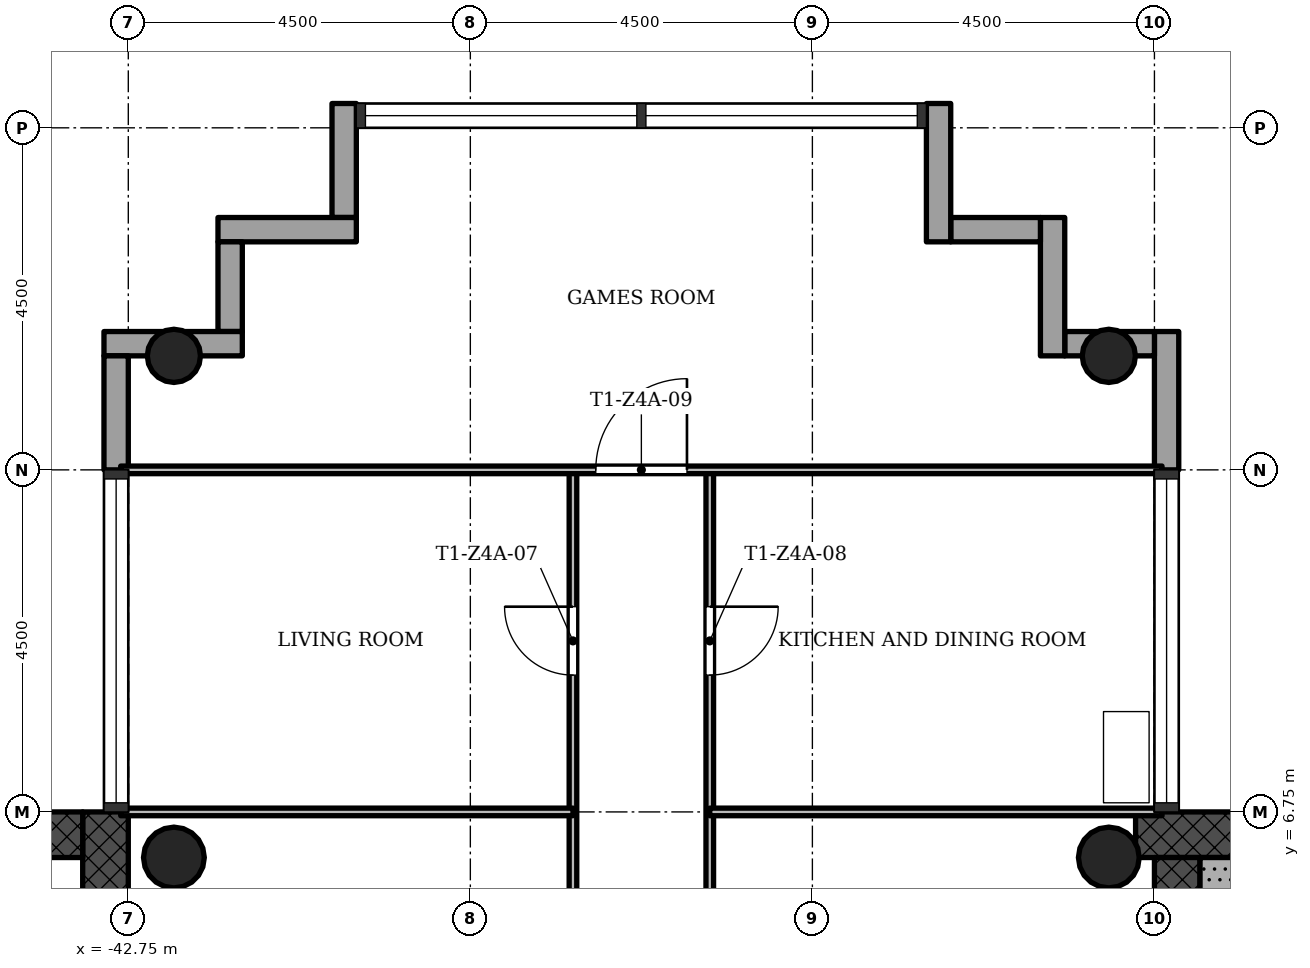
"""IFC4 building model, lengths in metres.
Left out: names, types, materials, properties, quantities, classifications, styles, units other than length and angle.
Written with IfcOpenShell. Run it as: python <this file> out.ifc"""

import sys

from ifc_helpers import new_model, si_unit, direction, frame, frame_2d, origin, origin_2d, place, context, subcontext, project, spatial, rectangle, hollow_circle, extrude, element, fill, save


model = new_model("IFC4")
c1 = context("Model", 3, precision=1e-05, world=origin(), true_north=direction((0.0, 1.0)))
c2 = subcontext(c1, "Body", "Model", "MODEL_VIEW")
j1 = project(units=[si_unit("LENGTHUNIT", "METRE"), si_unit("PLANEANGLEUNIT", "RADIAN")], contexts=[c1])
p1 = place(None, origin())
s1 = spatial("IfcSite", under=j1, at=p1, CompositionType="ELEMENT")
p2 = place(p1, origin())
s2 = spatial("IfcBuilding", under=s1, at=p2, CompositionType="ELEMENT")
p3 = place(p2, frame((0.0, 0.0, 226.6)))
s3 = spatial("IfcBuildingStorey", under=s2, at=p3, CompositionType="ELEMENT", Elevation=226.6)
p4 = place(p3, frame((-20.602, 6.45, 0.0), z_axis=(0.0, 0.0, 1.0), x_axis=(-1.0, 0.0, 0.0)))
e1 = element("IfcWall", 1, at=p4, inside=s3, PredefinedType="SHEAR", context=c2, shape_type="SweptSolid", body=[
    extrude(rectangle(XDim=8.896, YDim=0.6, at=frame_2d((4.448, 0.0))), origin(), (0.0, 0.0, 1.0), 3.4),
])
p5 = place(p3, frame((-28.95, 6.15, 0.0), z_axis=(0.0, 0.0, 1.0), x_axis=(0.0, -1.0, 0.0)))
e2 = element("IfcWall", 2, at=p5, inside=s3, PredefinedType="SHEAR", context=c2, shape_type="SweptSolid", body=[
    extrude(rectangle(XDim=12.9, YDim=0.6, at=frame_2d((6.45, 0.0))), origin(), (0.0, 0.0, 1.0), 3.4),
])
p6 = place(p5, frame((5.25, 0.0, 0.0)))
e3 = element("IfcOpeningElement", 3, at=p6, cuts=e2, PredefinedType="OPENING", context=c2, shape_type="SweptSolid", body=[
    extrude(rectangle(XDim=1.8, YDim=2.1, at=frame_2d((0.9, 1.05))), frame((0.0, 0.31, 0.0), z_axis=(0.0, -1.0, 0.0), x_axis=(1.0, 0.0, 0.0)), (0.0, 0.0, 1.0), 0.62),
])
p7 = place(p3, frame((-43.05, -6.15, 0.0), z_axis=(0.0, 0.0, 1.0), x_axis=(0.0, 1.0, 0.0)))
e4 = element("IfcWall", 4, at=p7, inside=s3, PredefinedType="SHEAR", context=c2, shape_type="SweptSolid", body=[
    extrude(rectangle(XDim=12.9, YDim=0.6, at=frame_2d((6.45, 0.0))), origin(), (0.0, 0.0, 1.0), 3.4),
])
p8 = place(p7, frame((5.25, 0.0, 0.0)))
e5 = element("IfcOpeningElement", 5, at=p8, cuts=e4, PredefinedType="OPENING", context=c2, shape_type="SweptSolid", body=[
    extrude(rectangle(XDim=1.8, YDim=2.1, at=frame_2d((0.9, 1.05))), frame((0.0, 0.31, 0.0), z_axis=(0.0, -1.0, 0.0), x_axis=(1.0, 0.0, 0.0)), (0.0, 0.0, 1.0), 0.62),
])
p9 = place(p3, frame((-43.35, 6.45, 0.0), z_axis=(0.0, 0.0, 1.0), x_axis=(-1.0, 0.0, 0.0)))
e6 = element("IfcWall", 6, at=p9, inside=s3, PredefinedType="SHEAR", context=c2, shape_type="SweptSolid", body=[
    extrude(rectangle(XDim=8.4, YDim=0.6, at=frame_2d((4.2, 0.0))), origin(), (0.0, 0.0, 1.0), 3.4),
])
for number, where, z_axis, x_axis in (
    (7, (-29.85, 12.75, 0.0), (0.0, 0.0, 1.0), (1.0, 0.0, 0.0)),
    (8, (-42.15, 12.75, 0.0), (0.0, 0.0, 1.0), (1.0, 0.0, 0.0)),
):
    element("IfcColumn", number, at=place(p3, frame(where, z_axis=z_axis, x_axis=x_axis)), inside=s3, PredefinedType="COLUMN", context=c2, shape_type="SweptSolid", body=[
        extrude(hollow_circle(Radius=0.35, WallThickness=0.025, at=origin_2d()), origin(), (0.0, 0.0, 1.0), 3.4),
    ])
for number, where, z_axis, x_axis in (
    (9, (-29.85, 6.15, 0.0), (0.0, 0.0, 1.0), (1.0, 0.0, 0.0)),
    (10, (-42.15, 6.15, 0.0), (0.0, 0.0, 1.0), (1.0, 0.0, 0.0)),
):
    element("IfcColumn", number, at=place(p3, frame(where, z_axis=z_axis, x_axis=x_axis)), inside=s3, PredefinedType="COLUMN", context=c2, shape_type="SweptSolid", body=[
        extrude(hollow_circle(Radius=0.4, WallThickness=0.028, at=origin_2d()), origin(), (0.0, 0.0, 1.0), 3.4),
    ])
p10 = place(p3, frame((-29.09, 11.25, -0.3), z_axis=(0.0, 0.0, 1.0), x_axis=(0.0, 1.0, 0.0)))
e11 = element("IfcWall", 11, at=p10, inside=s3, PredefinedType="STANDARD", context=c2, shape_type="SweptSolid", body=[
    extrude(rectangle(XDim=1.82, YDim=0.32, at=frame_2d((0.91, 0.0))), origin(), (0.0, 0.0, 1.0), 3.4),
])
p11 = place(p3, frame((-29.25, 12.91, -0.3), z_axis=(0.0, 0.0, 1.0), x_axis=(-1.0, 0.0, 0.0)))
e12 = element("IfcWall", 12, at=p11, inside=s3, PredefinedType="STANDARD", context=c2, shape_type="SweptSolid", body=[
    extrude(rectangle(XDim=1.18, YDim=0.32, at=frame_2d((0.59, 0.0))), origin(), (0.0, 0.0, 1.0), 3.4),
])
p12 = place(p3, frame((-30.59, 12.75, -0.3), z_axis=(0.0, 0.0, 1.0), x_axis=(0.0, 1.0, 0.0)))
e13 = element("IfcWall", 13, at=p12, inside=s3, PredefinedType="STANDARD", context=c2, shape_type="SweptSolid", body=[
    extrude(rectangle(XDim=1.82, YDim=0.32, at=frame_2d((0.91, 0.0))), origin(), (0.0, 0.0, 1.0), 3.4),
])
p13 = place(p3, frame((-30.75, 14.41, -0.3), z_axis=(0.0, 0.0, 1.0), x_axis=(-1.0, 0.0, 0.0)))
e14 = element("IfcWall", 14, at=p13, inside=s3, PredefinedType="STANDARD", context=c2, shape_type="SweptSolid", body=[
    extrude(rectangle(XDim=1.18, YDim=0.32, at=frame_2d((0.59, 0.0))), origin(), (0.0, 0.0, 1.0), 3.4),
])
p14 = place(p3, frame((-32.09, 14.25, -0.3), z_axis=(0.0, 0.0, 1.0), x_axis=(0.0, 1.0, 0.0)))
e15 = element("IfcWall", 15, at=p14, inside=s3, PredefinedType="STANDARD", context=c2, shape_type="SweptSolid", body=[
    extrude(rectangle(XDim=1.82, YDim=0.32, at=frame_2d((0.91, 0.0))), origin(), (0.0, 0.0, 1.0), 3.4),
])
p15 = place(p3, frame((-39.91, 16.07, -0.3), z_axis=(0.0, 0.0, 1.0), x_axis=(0.0, -1.0, 0.0)))
e16 = element("IfcWall", 16, at=p15, inside=s3, PredefinedType="STANDARD", context=c2, shape_type="SweptSolid", body=[
    extrude(rectangle(XDim=1.5, YDim=0.32, at=frame_2d((0.75, 0.0))), origin(), (0.0, 0.0, 1.0), 3.4),
])
p16 = place(p3, frame((-39.75, 14.41, -0.3), z_axis=(0.0, 0.0, 1.0), x_axis=(-1.0, 0.0, 0.0)))
e17 = element("IfcWall", 17, at=p16, inside=s3, PredefinedType="STANDARD", context=c2, shape_type="SweptSolid", body=[
    extrude(rectangle(XDim=1.82, YDim=0.32, at=frame_2d((0.91, 0.0))), origin(), (0.0, 0.0, 1.0), 3.4),
])
p17 = place(p3, frame((-41.41, 14.25, -0.3), z_axis=(0.0, 0.0, 1.0), x_axis=(0.0, -1.0, 0.0)))
e18 = element("IfcWall", 18, at=p17, inside=s3, PredefinedType="STANDARD", context=c2, shape_type="SweptSolid", body=[
    extrude(rectangle(XDim=1.18, YDim=0.32, at=frame_2d((0.59, 0.0))), origin(), (0.0, 0.0, 1.0), 3.4),
])
p18 = place(p3, frame((-41.25, 12.91, -0.3), z_axis=(0.0, 0.0, 1.0), x_axis=(-1.0, 0.0, 0.0)))
e19 = element("IfcWall", 19, at=p18, inside=s3, PredefinedType="STANDARD", context=c2, shape_type="SweptSolid", body=[
    extrude(rectangle(XDim=1.82, YDim=0.32, at=frame_2d((0.91, 0.0))), origin(), (0.0, 0.0, 1.0), 3.4),
])
p19 = place(p3, frame((-42.91, 12.75, -0.3), z_axis=(0.0, 0.0, 1.0), x_axis=(0.0, -1.0, 0.0)))
e20 = element("IfcWall", 20, at=p19, inside=s3, PredefinedType="STANDARD", context=c2, shape_type="SweptSolid", body=[
    extrude(rectangle(XDim=1.5, YDim=0.32, at=frame_2d((0.75, 0.0))), origin(), (0.0, 0.0, 1.0), 3.4),
])
p20 = place(p3, frame((-36.9, 4.5, 0.0), z_axis=(0.0, 0.0, 1.0), x_axis=(0.0, 1.0, 0.0)))
e21 = element("IfcWall", 21, at=p20, inside=s3, PredefinedType="PARTITIONING", context=c2, shape_type="SweptSolid", body=[
    extrude(rectangle(XDim=6.75, YDim=0.1, at=frame_2d((3.375, 0.0))), origin(), (0.0, 0.0, 1.0), 3.0),
])
p21 = place(p20, frame((4.05, 0.0, 0.0)))
e22 = element("IfcOpeningElement", 22, at=p21, cuts=e21, PredefinedType="OPENING", context=c2, shape_type="SweptSolid", body=[
    extrude(rectangle(XDim=0.9, YDim=2.1, at=frame_2d((0.45, 1.05))), frame((0.0, 0.06, 0.0), z_axis=(0.0, -1.0, 0.0), x_axis=(1.0, 0.0, 0.0)), (0.0, 0.0, 1.0), 0.12),
])
p22 = place(p3, frame((-35.1, 4.5, 0.0), z_axis=(0.0, 0.0, 1.0), x_axis=(0.0, 1.0, 0.0)))
e23 = element("IfcWall", 23, at=p22, inside=s3, PredefinedType="PARTITIONING", context=c2, shape_type="SweptSolid", body=[
    extrude(rectangle(XDim=6.75, YDim=0.1, at=frame_2d((3.375, 0.0))), origin(), (0.0, 0.0, 1.0), 3.0),
])
p23 = place(p22, frame((4.05, 0.0, 0.0)))
e24 = element("IfcOpeningElement", 24, at=p23, cuts=e23, PredefinedType="OPENING", context=c2, shape_type="SweptSolid", body=[
    extrude(rectangle(XDim=0.9, YDim=2.1, at=frame_2d((0.45, 1.05))), frame((0.0, 0.06, 0.0), z_axis=(0.0, -1.0, 0.0), x_axis=(1.0, 0.0, 0.0)), (0.0, 0.0, 1.0), 0.12),
])
for number, where, z_axis, x_axis in (
    (25, (-42.85, 6.75, 0.0), (0.0, 0.0, 1.0), (1.0, 0.0, 0.0)),
    (26, (-35.1, 6.75, 0.0), (0.0, 0.0, 1.0), (1.0, 0.0, 0.0)),
):
    element("IfcWall", number, at=place(p3, frame(where, z_axis=z_axis, x_axis=x_axis)), inside=s3, PredefinedType="PARTITIONING", context=c2, shape_type="SweptSolid", body=[
        extrude(rectangle(XDim=5.95, YDim=0.1, at=frame_2d((2.975, 0.0))), origin(), (0.0, 0.0, 1.0), 3.0),
    ])
p24 = place(p3, frame((-42.85, 11.25, 0.0), z_axis=(0.0, 0.0, 1.0), x_axis=(1.0, 0.0, 0.0)))
e27 = element("IfcWall", 27, at=p24, inside=s3, PredefinedType="PARTITIONING", context=c2, shape_type="SweptSolid", body=[
    extrude(rectangle(XDim=13.7, YDim=0.1, at=frame_2d((6.85, 0.0))), origin(), (0.0, 0.0, 1.0), 3.0),
])
p25 = place(p24, frame((6.25, 0.0, 0.0)))
e28 = element("IfcOpeningElement", 28, at=p25, cuts=e27, PredefinedType="OPENING", context=c2, shape_type="SweptSolid", body=[
    extrude(rectangle(XDim=1.2, YDim=2.1, at=frame_2d((0.6, 1.05))), frame((0.0, 0.06, 0.0), z_axis=(0.0, -1.0, 0.0), x_axis=(1.0, 0.0, 0.0)), (0.0, 0.0, 1.0), 0.12),
])
p26 = place(p3, frame((-28.35, 1.85, 0.0), z_axis=(0.0, 0.0, 1.0), x_axis=(0.0, 1.0, 0.0)))
e29 = element("IfcWall", 29, at=p26, inside=s3, PredefinedType="SHEAR", context=c2, shape_type="SweptSolid", body=[
    extrude(rectangle(XDim=4.3, YDim=0.6, at=frame_2d((2.15, 0.0))), origin(), (0.0, 0.0, 1.0), 3.4),
])
p27 = place(p21, origin())
e30 = element("IfcDoor", 30, at=p27, inside=s3, OperationType="SINGLE_SWING_LEFT", PredefinedType="DOOR", context=c2, shape_type="SweptSolid", body=[
    extrude(rectangle(XDim=0.9, YDim=2.1, at=frame_2d((0.45, 1.05))), frame((0.0, 0.025, 0.0), z_axis=(0.0, -1.0, 0.0), x_axis=(1.0, 0.0, 0.0)), (0.0, 0.0, 1.0), 0.05),
])
fill(e22, e30)
p28 = place(p23, origin())
e31 = element("IfcDoor", 31, at=p28, inside=s3, OperationType="SINGLE_SWING_RIGHT", PredefinedType="DOOR", context=c2, shape_type="SweptSolid", body=[
    extrude(rectangle(XDim=0.9, YDim=2.1, at=frame_2d((0.45, 1.05))), frame((0.0, 0.025, 0.0), z_axis=(0.0, -1.0, 0.0), x_axis=(1.0, 0.0, 0.0)), (0.0, 0.0, 1.0), 0.05),
])
fill(e24, e31)
p29 = place(p25, origin())
e32 = element("IfcDoor", 32, at=p29, inside=s3, OperationType="SINGLE_SWING_LEFT", PredefinedType="DOOR", context=c2, shape_type="SweptSolid", body=[
    extrude(rectangle(XDim=1.2, YDim=2.1, at=frame_2d((0.6, 1.05))), frame((0.0, 0.025, 0.0), z_axis=(0.0, -1.0, 0.0), x_axis=(1.0, 0.0, 0.0)), (0.0, 0.0, 1.0), 0.05),
])
fill(e28, e32)
save(model, sys.argv[1])
